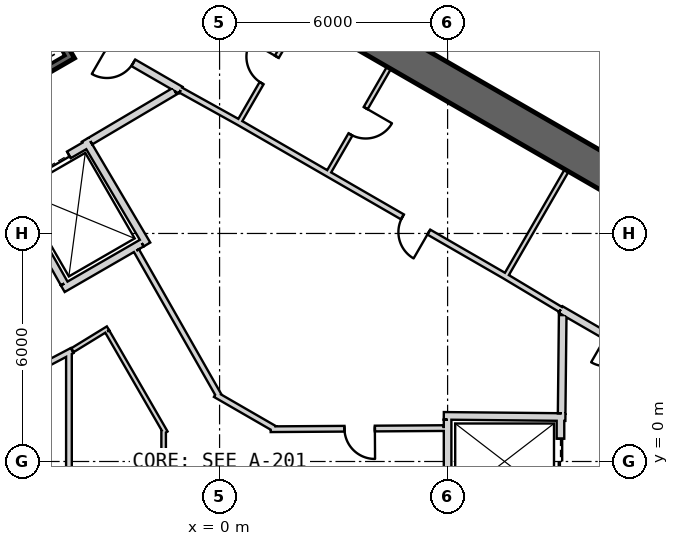
"""IFC4 building model, lengths in metres.
Left out: names, types, materials, properties, quantities, classifications, styles, units other than length and angle.
Written with IfcOpenShell. Run it as: python <this file> out.ifc"""

import sys

from ifc_helpers import new_model, si_unit, direction, frame, frame_2d, origin, place, context, subcontext, project, spatial, rectangle, extrude, element, fill, save


model = new_model("IFC4")
c1 = context("Model", 3, precision=1e-05, world=origin(), true_north=direction((0.0, 1.0)))
c2 = subcontext(c1, "Body", "Model", "MODEL_VIEW")
j1 = project(units=[si_unit("LENGTHUNIT", "METRE"), si_unit("PLANEANGLEUNIT", "RADIAN")], contexts=[c1])
p1 = place(None, origin())
s1 = spatial("IfcSite", under=j1, at=p1, CompositionType="ELEMENT")
p2 = place(p1, origin())
s2 = spatial("IfcBuilding", under=s1, at=p2, CompositionType="ELEMENT")
p3 = place(p2, frame((0.0, 0.0, -11.0)))
s3 = spatial("IfcBuildingStorey", under=s2, at=p3, CompositionType="ELEMENT", Elevation=-11.0)
p4 = place(p3, frame((19.475, 2.208, -0.4), z_axis=(0.0, 0.0, 1.0), x_axis=(-0.866028369851, 0.499994862586, 0.0)))
e1 = element("IfcWall", 1, at=p4, inside=s3, PredefinedType="SHEAR", context=c2, shape_type="SweptSolid", body=[
    extrude(rectangle(XDim=31.523, YDim=0.9, at=frame_2d((15.762, 0.0))), origin(), (0.0, 0.0, 1.0), 5.9),
])
p5 = place(p4, frame((3.612, 0.0, 0.4)))
e2 = element("IfcOpeningElement", 2, at=p5, cuts=e1, PredefinedType="OPENING", context=c2, shape_type="SweptSolid", body=[
    extrude(rectangle(XDim=1.2, YDim=2.4, at=frame_2d((0.6, 1.2))), frame((0.0, 0.46, 0.0), z_axis=(0.0, -1.0, 0.0), x_axis=(1.0, 0.0, 0.0)), (0.0, 0.0, 1.0), 0.92),
])
p6 = place(p4, frame((26.712, 0.0, 0.4)))
e3 = element("IfcOpeningElement", 3, at=p6, cuts=e1, PredefinedType="OPENING", context=c2, shape_type="SweptSolid", body=[
    extrude(rectangle(XDim=1.2, YDim=2.4, at=frame_2d((0.6, 1.2))), frame((0.0, 0.46, 0.0), z_axis=(0.0, -1.0, 0.0), x_axis=(1.0, 0.0, 0.0)), (0.0, 0.0, 1.0), 0.92),
])
p7 = place(p3, frame((8.97, 1.2, 0.0), z_axis=(0.0, 0.0, 1.0), x_axis=(0.0, -1.0, 0.0)))
e4 = element("IfcWall", 4, at=p7, inside=s3, PredefinedType="PLUMBINGWALL", context=c2, shape_type="SweptSolid", body=[
    extrude(rectangle(XDim=2.4, YDim=0.2, at=frame_2d((1.2, 0.0))), origin(), (0.0, 0.0, 1.0), 5.1),
])
p8 = place(p7, frame((0.6, 0.0, 0.0)))
e5 = element("IfcOpeningElement", 5, at=p8, cuts=e4, PredefinedType="OPENING", context=c2, shape_type="SweptSolid", body=[
    extrude(rectangle(XDim=1.2, YDim=2.4, at=frame_2d((0.6, 1.2))), frame((0.0, 0.11, 0.0), z_axis=(0.0, -1.0, 0.0), x_axis=(1.0, 0.0, 0.0)), (0.0, 0.0, 1.0), 0.22),
])
p9 = place(p3, frame((6.0, -1.1, 0.0), z_axis=(0.0, 0.0, 1.0), x_axis=(0.0, 1.0, 0.0)))
e6 = element("IfcWall", 6, at=p9, inside=s3, PredefinedType="PLUMBINGWALL", context=c2, shape_type="SweptSolid", body=[
    extrude(rectangle(XDim=2.2, YDim=0.2, at=frame_2d((1.1, 0.0))), origin(), (0.0, 0.0, 1.0), 5.1),
])
p10 = place(p3, frame((5.9, 1.201, 0.0), z_axis=(0.0, 0.0, 1.0), x_axis=(0.999950064753, -0.009993397809, 0.0)))
e7 = element("IfcWall", 7, at=p10, inside=s3, PredefinedType="PLUMBINGWALL", context=c2, shape_type="SweptSolid", body=[
    extrude(rectangle(XDim=3.2, YDim=0.2, at=frame_2d((1.6, 0.0))), origin(), (0.0, 0.0, 1.0), 5.1),
])
p11 = place(p3, frame((-7.854, 17.405, -0.4), z_axis=(0.0, 0.0, 1.0), x_axis=(0.499997992926, -0.866026562566, 0.0)))
e8 = element("IfcWall", 8, at=p11, inside=s3, PredefinedType="SHEAR", context=c2, shape_type="SweptSolid", body=[
    extrude(rectangle(XDim=7.9, YDim=0.2, at=frame_2d((3.95, 0.0))), origin(), (0.0, 0.0, 1.0), 5.5),
])
p12 = place(p3, frame((-7.159, 8.8, -0.4), z_axis=(0.0, 0.0, 1.0), x_axis=(0.866047807691, 0.499961193289, 0.0)))
e9 = element("IfcWall", 9, at=p12, inside=s3, PredefinedType="SHEAR", context=c2, shape_type="SweptSolid", body=[
    extrude(rectangle(XDim=3.6, YDim=0.2, at=frame_2d((1.8, 0.0))), origin(), (0.0, 0.0, 1.0), 5.5),
])
p13 = place(p12, frame((1.25, 0.0, 0.4)))
e10 = element("IfcOpeningElement", 10, at=p13, cuts=e9, PredefinedType="OPENING", context=c2, shape_type="SweptSolid", body=[
    extrude(rectangle(XDim=1.1, YDim=2.1, at=frame_2d((0.55, 1.05))), frame((0.0, 0.11, 0.0), z_axis=(0.0, -1.0, 0.0), x_axis=(1.0, 0.0, 0.0)), (0.0, 0.0, 1.0), 0.22),
])
p14 = place(p3, frame((-5.524, 7.168, 0.0), z_axis=(0.0, 0.0, 1.0), x_axis=(0.866024647952, 0.500001309137, 0.0)))
e11 = element("IfcWall", 11, at=p14, inside=s3, PredefinedType="PLUMBINGWALL", context=c2, shape_type="SweptSolid", body=[
    extrude(rectangle(XDim=2.4, YDim=0.2, at=frame_2d((1.2, 0.0))), origin(), (0.0, 0.0, 1.0), 5.1),
])
p15 = place(p14, frame((0.6, 0.0, 0.0)))
e12 = element("IfcOpeningElement", 12, at=p15, cuts=e11, PredefinedType="OPENING", context=c2, shape_type="SweptSolid", body=[
    extrude(rectangle(XDim=1.2, YDim=2.4, at=frame_2d((0.6, 1.2))), frame((0.0, 0.11, 0.0), z_axis=(0.0, -1.0, 0.0), x_axis=(1.0, 0.0, 0.0)), (0.0, 0.0, 1.0), 0.22),
])
p16 = place(p3, frame((-3.538, 8.465, 0.0), z_axis=(0.0, 0.0, 1.0), x_axis=(0.508616218331, -0.860993346345, 0.0)))
e13 = element("IfcWall", 13, at=p16, inside=s3, PredefinedType="PLUMBINGWALL", context=c2, shape_type="SweptSolid", body=[
    extrude(rectangle(XDim=3.2, YDim=0.2, at=frame_2d((1.6, 0.0))), origin(), (0.0, 0.0, 1.0), 5.1),
])
p17 = place(p3, frame((-2.047, 5.746, 0.0), z_axis=(0.0, 0.0, 1.0), x_axis=(-0.866024647952, -0.500001309137, 0.0)))
e14 = element("IfcWall", 14, at=p17, inside=s3, PredefinedType="PLUMBINGWALL", context=c2, shape_type="SweptSolid", body=[
    extrude(rectangle(XDim=2.4, YDim=0.2, at=frame_2d((1.2, 0.0))), origin(), (0.0, 0.0, 1.0), 5.1),
])
p18 = place(p3, frame((-5.562, 7.296, 0.0), z_axis=(0.0, 0.0, 1.0), x_axis=(0.49134651263, -0.870964180966, 0.0)))
e15 = element("IfcWall", 15, at=p18, inside=s3, PredefinedType="PLUMBINGWALL", context=c2, shape_type="SweptSolid", body=[
    extrude(rectangle(XDim=3.0, YDim=0.2, at=frame_2d((1.5, 0.0))), origin(), (0.0, 0.0, 1.0), 5.1),
])
p19 = place(p3, frame((9.133, 7.659, 0.0), z_axis=(0.0, 0.0, 1.0), x_axis=(-0.500017246033, -0.866015446554, 0.0)))
e16 = element("IfcWall", 16, at=p19, inside=s3, PredefinedType="PARTITIONING", context=c2, shape_type="SweptSolid", body=[
    extrude(rectangle(XDim=3.25, YDim=0.12, at=frame_2d((1.625, 0.0))), origin(), (0.0, 0.0, 1.0), 5.1),
])
p20 = place(p3, frame((-4.296, 11.66, 0.0), z_axis=(0.0, 0.0, 1.0), x_axis=(0.866027389382, -0.499996560828, 0.0)))
e17 = element("IfcWall", 17, at=p20, inside=s3, PredefinedType="PARTITIONING", context=c2, shape_type="SweptSolid", body=[
    extrude(rectangle(XDim=3.778, YDim=0.2, at=frame_2d((1.889, 0.0))), origin(), (0.0, 0.0, 1.0), 5.1),
])
p21 = place(p20, frame((1.539, 0.0, 0.0)))
e18 = element("IfcOpeningElement", 18, at=p21, cuts=e17, PredefinedType="OPENING", context=c2, shape_type="SweptSolid", body=[
    extrude(rectangle(XDim=0.8, YDim=2.1, at=frame_2d((0.4, 1.05))), frame((0.0, 0.11, 0.0), z_axis=(0.0, -1.0, 0.0), x_axis=(1.0, 0.0, 0.0)), (0.0, 0.0, 1.0), 0.22),
])
p22 = place(p3, frame((8.974, 3.999, 0.0), z_axis=(0.0, 0.0, 1.0), x_axis=(0.86601284211, -0.500021756827, 0.0)))
e19 = element("IfcWall", 19, at=p22, inside=s3, PredefinedType="PARTITIONING", context=c2, shape_type="SweptSolid", body=[
    extrude(rectangle(XDim=3.577, YDim=0.2, at=frame_2d((1.789, 0.0))), origin(), (0.0, 0.0, 1.0), 5.1),
])
p23 = place(p22, frame((1.389, 0.0, 0.0)))
e20 = element("IfcOpeningElement", 20, at=p23, cuts=e19, PredefinedType="OPENING", context=c2, shape_type="SweptSolid", body=[
    extrude(rectangle(XDim=0.8, YDim=2.1, at=frame_2d((0.4, 1.05))), frame((0.0, 0.11, 0.0), z_axis=(0.0, -1.0, 0.0), x_axis=(1.0, 0.0, 0.0)), (0.0, 0.0, 1.0), 0.22),
])
p24 = place(p3, frame((8.975, 4.0, 0.0), z_axis=(0.0, 0.0, 1.0), x_axis=(-0.857530436795, 0.514433231791, 0.0)))
e21 = element("IfcWall", 21, at=p24, inside=s3, PredefinedType="PLUMBINGWALL", context=c2, shape_type="SweptSolid", body=[
    extrude(rectangle(XDim=1.723, YDim=0.15, at=frame_2d((0.861, 0.0))), origin(), (0.0, 0.0, 1.0), 5.1),
])
p25 = place(p3, frame((4.457, 10.359, 0.0), z_axis=(0.0, 0.0, 1.0), x_axis=(-0.500017246033, -0.866015446554, 0.0)))
e22 = element("IfcWall", 22, at=p25, inside=s3, PredefinedType="PARTITIONING", context=c2, shape_type="SweptSolid", body=[
    extrude(rectangle(XDim=3.25, YDim=0.12, at=frame_2d((1.625, 0.0))), origin(), (0.0, 0.0, 1.0), 5.1),
])
p26 = place(p25, frame((1.225, 0.0, 0.0)))
e23 = element("IfcOpeningElement", 23, at=p26, cuts=e22, PredefinedType="OPENING", context=c2, shape_type="SweptSolid", body=[
    extrude(rectangle(XDim=0.8, YDim=2.1, at=frame_2d((0.4, 1.05))), frame((0.0, 0.07, 0.0), z_axis=(0.0, -1.0, 0.0), x_axis=(1.0, 0.0, 0.0)), (0.0, 0.0, 1.0), 0.14),
])
p27 = place(p3, frame((7.497, 4.886, 0.0), z_axis=(0.0, 0.0, 1.0), x_axis=(-0.866030989016, 0.499990325971, 0.0)))
e24 = element("IfcWall", 24, at=p27, inside=s3, PredefinedType="PLUMBINGWALL", context=c2, shape_type="SweptSolid", body=[
    extrude(rectangle(XDim=8.1, YDim=0.15, at=frame_2d((4.05, 0.0))), origin(), (0.0, 0.0, 1.0), 5.1),
])
p28 = place(p27, frame((2.3, 0.0, 0.0)))
e25 = element("IfcOpeningElement", 25, at=p28, cuts=e24, PredefinedType="OPENING", context=c2, shape_type="SweptSolid", body=[
    extrude(rectangle(XDim=0.8, YDim=2.1, at=frame_2d((0.4, 1.05))), frame((0.0, 0.085, 0.0), z_axis=(0.0, -1.0, 0.0), x_axis=(1.0, 0.0, 0.0)), (0.0, 0.0, 1.0), 0.17),
])
p29 = place(p3, frame((0.494, 8.895, 0.0), z_axis=(0.0, 0.0, 1.0), x_axis=(0.500017246033, 0.866015446554, 0.0)))
e26 = element("IfcWall", 26, at=p29, inside=s3, PredefinedType="PARTITIONING", context=c2, shape_type="SweptSolid", body=[
    extrude(rectangle(XDim=3.25, YDim=0.12, at=frame_2d((1.625, 0.0))), origin(), (0.0, 0.0, 1.0), 5.1),
])
p30 = place(p29, frame((1.225, 0.0, 0.0)))
e27 = element("IfcOpeningElement", 27, at=p30, cuts=e26, PredefinedType="OPENING", context=c2, shape_type="SweptSolid", body=[
    extrude(rectangle(XDim=0.8, YDim=2.1, at=frame_2d((0.4, 1.05))), frame((0.0, 0.07, 0.0), z_axis=(0.0, -1.0, 0.0), x_axis=(1.0, 0.0, 0.0)), (0.0, 0.0, 1.0), 0.14),
])
p31 = place(p3, frame((0.483, 8.936, 0.0), z_axis=(0.0, 0.0, 1.0), x_axis=(-0.874290944206, 0.485402250592, 0.0)))
e28 = element("IfcWall", 28, at=p31, inside=s3, PredefinedType="PLUMBINGWALL", context=c2, shape_type="SweptSolid", body=[
    extrude(rectangle(XDim=1.723, YDim=0.15, at=frame_2d((0.861, 0.0))), origin(), (0.0, 0.0, 1.0), 5.1),
])
for number, where, z_axis, x_axis in (
    (29, (9.001, 1.27, 0.0), (0.0, 0.0, 1.0), (0.011, 1.0, 0.0)),
    (30, (-1.179, 9.745, 0.0), (0.0, 0.0, 1.0), (-0.861, -0.509, 0.0)),
):
    element("IfcWall", number, at=place(p3, frame(where, z_axis=z_axis, x_axis=x_axis)), inside=s3, PredefinedType="PARTITIONING", context=c2, shape_type="SweptSolid", body=[
        extrude(rectangle(XDim=2.582, YDim=0.2, at=frame_2d((1.291, 0.0))), origin(), (0.0, 0.0, 1.0), 5.1),
    ])
p32 = place(p3, frame((1.344, 0.849, 0.0), z_axis=(0.0, 0.0, 1.0), x_axis=(0.999978627641, 0.00653790957, 0.0)))
e31 = element("IfcWall", 31, at=p32, inside=s3, PredefinedType="PLUMBINGWALL", context=c2, shape_type="SweptSolid", body=[
    extrude(rectangle(XDim=4.556, YDim=0.15, at=frame_2d((2.278, 0.0))), origin(), (0.0, 0.0, 1.0), 5.1),
])
p33 = place(p32, frame((1.942, 0.0, 0.0)))
e32 = element("IfcOpeningElement", 32, at=p33, cuts=e31, PredefinedType="OPENING", context=c2, shape_type="SweptSolid", body=[
    extrude(rectangle(XDim=0.8, YDim=2.1, at=frame_2d((0.4, 1.05))), frame((0.0, 0.085, 0.0), z_axis=(0.0, -1.0, 0.0), x_axis=(1.0, 0.0, 0.0)), (0.0, 0.0, 1.0), 0.17),
])
p34 = place(p3, frame((-0.111, 1.764, 0.0), z_axis=(0.0, 0.0, 1.0), x_axis=(0.866061671171, -0.499937177781, 0.0)))
e33 = element("IfcWall", 33, at=p34, inside=s3, PredefinedType="PLUMBINGWALL", context=c2, shape_type="SweptSolid", body=[
    extrude(rectangle(XDim=1.804, YDim=0.15, at=frame_2d((0.902, 0.0))), origin(), (0.0, 0.0, 1.0), 5.1),
])
p35 = place(p3, frame((-2.189, 5.549, 0.0), z_axis=(0.0, 0.0, 1.0), x_axis=(0.494335077001, -0.869271437266, 0.0)))
e34 = element("IfcWall", 34, at=p35, inside=s3, PredefinedType="PLUMBINGWALL", context=c2, shape_type="SweptSolid", body=[
    extrude(rectangle(XDim=4.404, YDim=0.15, at=frame_2d((2.202, 0.0))), origin(), (0.0, 0.0, 1.0), 5.1),
])
p36 = place(p3, frame((-3.964, -2.908, 0.0), z_axis=(0.0, 0.0, 1.0), x_axis=(0.0, 1.0, 0.0)))
e35 = element("IfcWall", 35, at=p36, inside=s3, PredefinedType="PLUMBINGWALL", context=c2, shape_type="SweptSolid", body=[
    extrude(rectangle(XDim=5.815, YDim=0.15, at=frame_2d((2.908, 0.0))), origin(), (0.0, 0.0, 1.0), 5.1),
])
p37 = place(p3, frame((-3.881, 2.919, 0.0), z_axis=(0.0, 0.0, 1.0), x_axis=(-0.885422176933, -0.464787659684, 0.0)))
e36 = element("IfcWall", 36, at=p37, inside=s3, PredefinedType="PLUMBINGWALL", context=c2, shape_type="SweptSolid", body=[
    extrude(rectangle(XDim=0.724, YDim=0.15, at=frame_2d((0.362, 0.0))), origin(), (0.0, 0.0, 1.0), 5.1),
])
p38 = place(p3, frame((-2.935, 3.503, 0.0), z_axis=(0.0, 0.0, 1.0), x_axis=(-0.852482838041, -0.522755211209, 0.0)))
e37 = element("IfcWall", 37, at=p38, inside=s3, PredefinedType="PARTITIONING", context=c2, shape_type="SweptSolid", body=[
    extrude(rectangle(XDim=1.097, YDim=0.12, at=frame_2d((0.548, 0.0))), origin(), (0.0, 0.0, 1.0), 5.1),
])
p39 = place(p3, frame((-1.42, 0.76, 0.0), z_axis=(0.0, 0.0, 1.0), x_axis=(-0.500011413361, 0.866018814177, 0.0)))
e38 = element("IfcWall", 38, at=p39, inside=s3, PredefinedType="PARTITIONING", context=c2, shape_type="SweptSolid", body=[
    extrude(rectangle(XDim=3.072, YDim=0.12, at=frame_2d((1.536, 0.0))), origin(), (0.0, 0.0, 1.0), 5.1),
])
p40 = place(p3, frame((-1.472, -0.954, 0.0), z_axis=(0.0, 0.0, 1.0), x_axis=(0.0, 1.0, 0.0)))
e39 = element("IfcWall", 39, at=p40, inside=s3, PredefinedType="PARTITIONING", context=c2, shape_type="SweptSolid", body=[
    extrude(rectangle(XDim=1.785, YDim=0.12, at=frame_2d((0.893, 0.0))), origin(), (0.0, 0.0, 1.0), 5.1),
])
p41 = place(p3, frame((30.376, 1.169, 0.0), z_axis=(0.0, 0.0, 1.0), x_axis=(-0.865777000343, 0.500430000777, 0.0)))
e40 = element("IfcWall", 40, at=p41, inside=s3, PredefinedType="PARTITIONING", context=c2, shape_type="SweptSolid", body=[
    extrude(rectangle(XDim=39.978, YDim=0.12, at=frame_2d((19.989, 0.0))), origin(), (0.0, 0.0, 1.0), 4.18),
])
p42 = place(p41, frame((28.784, 0.0, 0.0)))
e41 = element("IfcOpeningElement", 41, at=p42, cuts=e40, PredefinedType="OPENING", context=c2, shape_type="SweptSolid", body=[
    extrude(rectangle(XDim=1.2, YDim=2.4, at=frame_2d((0.6, 1.2))), frame((0.0, 0.07, 0.0), z_axis=(0.0, -1.0, 0.0), x_axis=(1.0, 0.0, 0.0)), (0.0, 0.0, 1.0), 0.14),
])
p43 = place(p41, frame((9.984, 0.0, 0.0)))
e42 = element("IfcOpeningElement", 42, at=p43, cuts=e40, PredefinedType="OPENING", context=c2, shape_type="SweptSolid", body=[
    extrude(rectangle(XDim=1.2, YDim=2.4, at=frame_2d((0.6, 1.2))), frame((0.0, 0.07, 0.0), z_axis=(0.0, -1.0, 0.0), x_axis=(1.0, 0.0, 0.0)), (0.0, 0.0, 1.0), 0.14),
])
p44 = place(p8, origin())
e43 = element("IfcDoor", 43, at=p44, inside=s3, OperationType="SLIDING_TO_LEFT", PredefinedType="USERDEFINED", context=c2, shape_type="SweptSolid", body=[
    extrude(rectangle(XDim=1.2, YDim=2.4, at=frame_2d((0.6, 1.2))), frame((0.0, 0.025, 0.0), z_axis=(0.0, -1.0, 0.0), x_axis=(1.0, 0.0, 0.0)), (0.0, 0.0, 1.0), 0.05),
])
fill(e5, e43)
p45 = place(p15, origin())
e44 = element("IfcDoor", 44, at=p45, inside=s3, OperationType="SLIDING_TO_LEFT", PredefinedType="USERDEFINED", context=c2, shape_type="SweptSolid", body=[
    extrude(rectangle(XDim=1.2, YDim=2.4, at=frame_2d((0.6, 1.2))), frame((0.0, 0.025, 0.0), z_axis=(0.0, -1.0, 0.0), x_axis=(1.0, 0.0, 0.0)), (0.0, 0.0, 1.0), 0.05),
])
fill(e12, e44)
p46 = place(p33, origin())
e45 = element("IfcDoor", 45, at=p46, inside=s3, OperationType="SINGLE_SWING_RIGHT", PredefinedType="USERDEFINED", context=c2, shape_type="SweptSolid", body=[
    extrude(rectangle(XDim=0.8, YDim=2.1, at=frame_2d((0.4, 1.05))), frame((0.0, 0.025, 0.0), z_axis=(0.0, -1.0, 0.0), x_axis=(1.0, 0.0, 0.0)), (0.0, 0.0, 1.0), 0.05),
])
fill(e32, e45)
p47 = place(p26, origin())
e46 = element("IfcDoor", 46, at=p47, inside=s3, OperationType="SINGLE_SWING_LEFT", PredefinedType="USERDEFINED", context=c2, shape_type="SweptSolid", body=[
    extrude(rectangle(XDim=0.8, YDim=2.1, at=frame_2d((0.4, 1.05))), frame((0.0, 0.025, 0.0), z_axis=(0.0, -1.0, 0.0), x_axis=(1.0, 0.0, 0.0)), (0.0, 0.0, 1.0), 0.05),
])
fill(e23, e46)
p48 = place(p21, origin())
e47 = element("IfcDoor", 47, at=p48, inside=s3, OperationType="SINGLE_SWING_LEFT", PredefinedType="USERDEFINED", context=c2, shape_type="SweptSolid", body=[
    extrude(rectangle(XDim=0.8, YDim=2.1, at=frame_2d((0.4, 1.05))), frame((0.0, 0.025, 0.0), z_axis=(0.0, -1.0, 0.0), x_axis=(1.0, 0.0, 0.0)), (0.0, 0.0, 1.0), 0.05),
])
fill(e18, e47)
p49 = place(p28, origin())
e48 = element("IfcDoor", 48, at=p49, inside=s3, OperationType="SINGLE_SWING_LEFT", PredefinedType="USERDEFINED", context=c2, shape_type="SweptSolid", body=[
    extrude(rectangle(XDim=0.8, YDim=2.1, at=frame_2d((0.4, 1.05))), frame((0.0, 0.025, 0.0), z_axis=(0.0, -1.0, 0.0), x_axis=(1.0, 0.0, 0.0)), (0.0, 0.0, 1.0), 0.05),
])
fill(e25, e48)
p50 = place(p30, origin())
e49 = element("IfcDoor", 49, at=p50, inside=s3, OperationType="SINGLE_SWING_RIGHT", PredefinedType="USERDEFINED", context=c2, shape_type="SweptSolid", body=[
    extrude(rectangle(XDim=0.8, YDim=2.1, at=frame_2d((0.4, 1.05))), frame((0.0, 0.025, 0.0), z_axis=(0.0, -1.0, 0.0), x_axis=(1.0, 0.0, 0.0)), (0.0, 0.0, 1.0), 0.05),
])
fill(e27, e49)
save(model, sys.argv[1])
